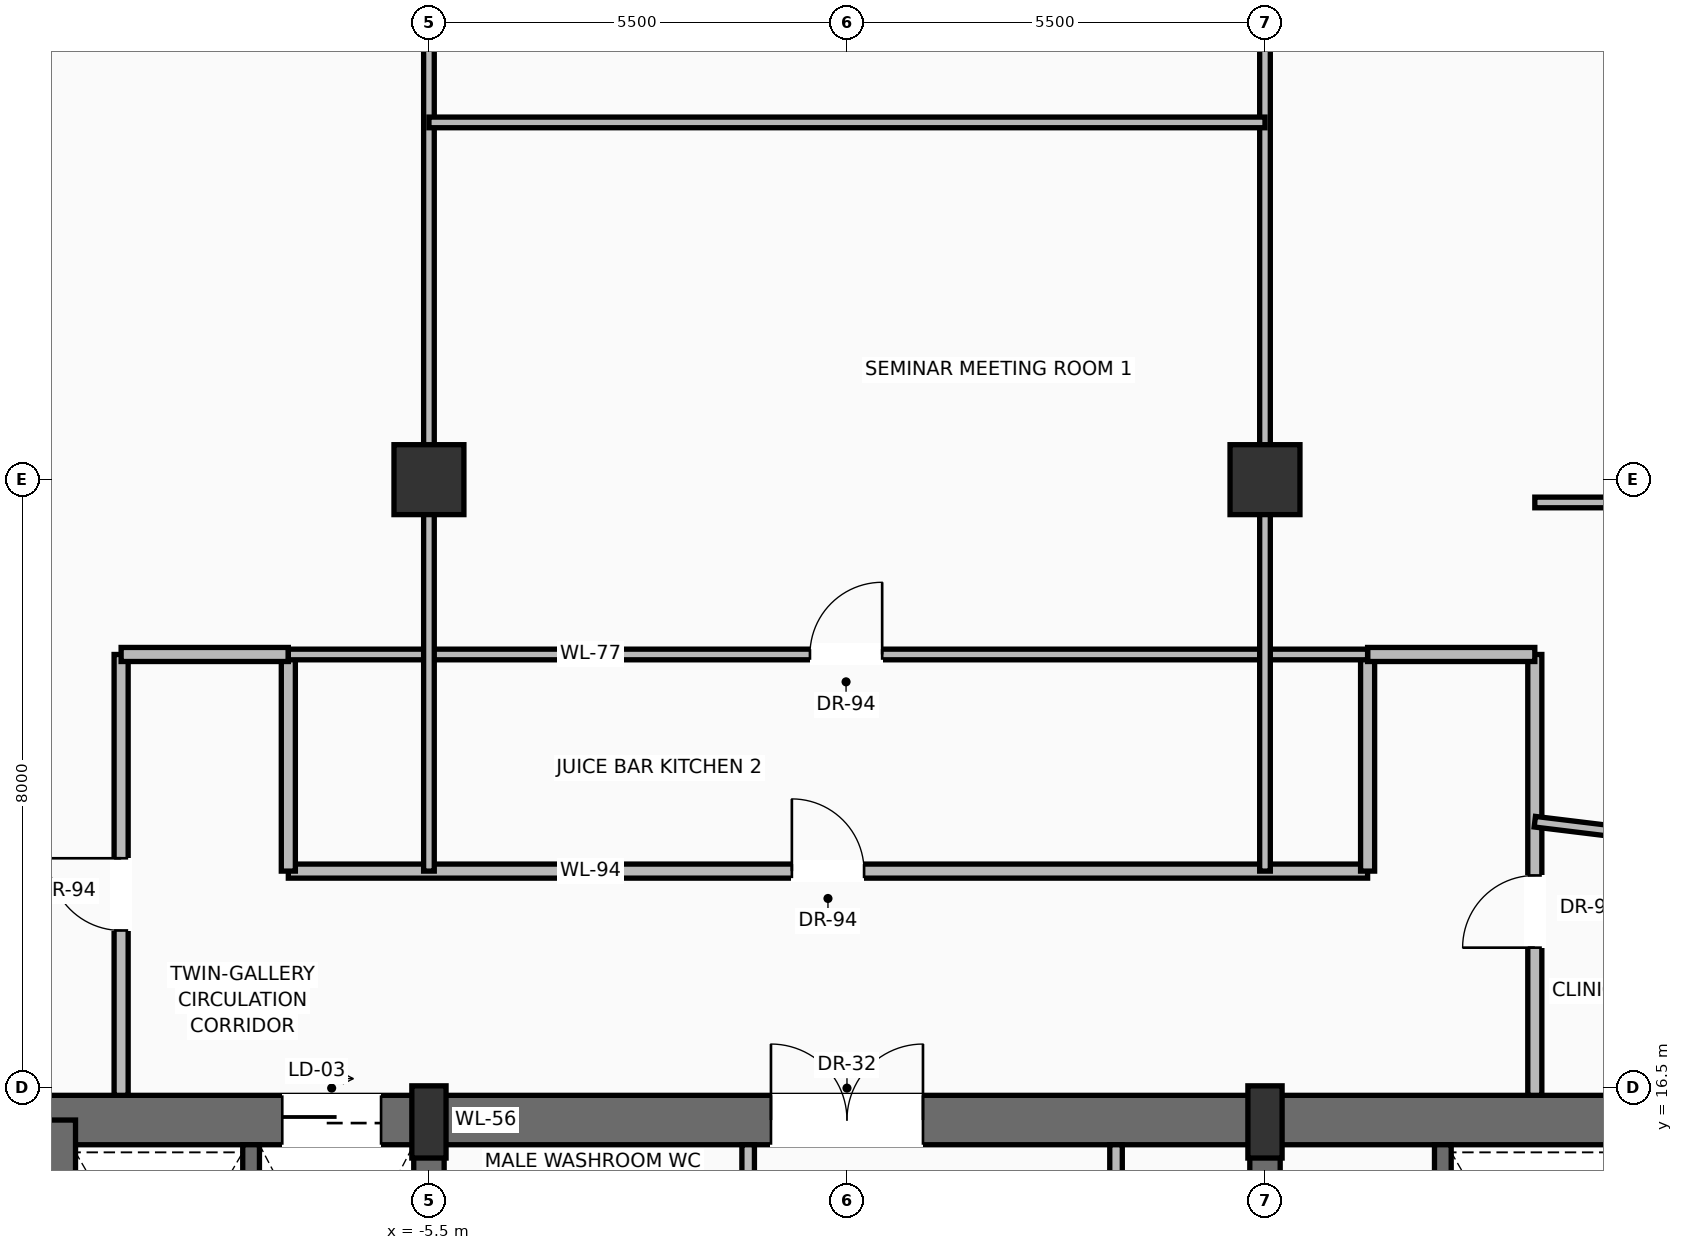
"""IFC4 building model, lengths in metres.
Left out: names, types, materials, properties, quantities, classifications, styles, units other than length and angle.
Written with IfcOpenShell. Run it as: python <this file> out.ifc"""

import sys

from ifc_helpers import new_model, si_unit, direction, frame, frame_2d, origin, origin_2d, place, context, subcontext, project, spatial, rectangle, extrude, source, transform, mapped, element, fill, save


model = new_model("IFC4")
c1 = context("Model", 3, precision=1e-05, world=origin(), true_north=direction((0.0, 1.0)))
c2 = subcontext(c1, "Body", "Model", "MODEL_VIEW")
j1 = project(units=[si_unit("LENGTHUNIT", "METRE"), si_unit("PLANEANGLEUNIT", "RADIAN")], contexts=[c1])
p1 = place(None, origin())
s1 = spatial("IfcSite", under=j1, at=p1, CompositionType="ELEMENT")
p2 = place(p1, origin())
s2 = spatial("IfcBuilding", under=s1, at=p2, CompositionType="ELEMENT")
p3 = place(p2, frame((0.0, 0.0, 200.6)))
s3 = spatial("IfcBuildingStorey", under=s2, at=p3, CompositionType="ELEMENT", Elevation=200.6)
p4 = place(p3, frame((-10.8, 16.075, 0.0), z_axis=(0.0, 0.0, 1.0), x_axis=(1.0, 0.0, 0.0)))
e1 = element("IfcWall", 1, at=p4, inside=s3, PredefinedType="SHEAR", context=c2, shape_type="SweptSolid", body=[
    extrude(rectangle(XDim=21.6, YDim=0.65, at=frame_2d((10.8, 0.0))), origin(), (0.0, 0.0, 1.0), 3.47),
])
p5 = place(p4, frame((3.37, 0.0, 0.0)))
e2 = element("IfcOpeningElement", 2, at=p5, cuts=e1, PredefinedType="OPENING", context=c2, shape_type="SweptSolid", body=[
    extrude(rectangle(XDim=1.3, YDim=2.3, at=frame_2d((0.65, 1.15))), frame((0.0, 0.335, 0.0), z_axis=(0.0, -1.0, 0.0), x_axis=(1.0, 0.0, 0.0)), (0.0, 0.0, 1.0), 0.67),
])
p6 = place(p4, frame((9.8, 0.0, 0.0)))
e3 = element("IfcOpeningElement", 3, at=p6, cuts=e1, PredefinedType="OPENING", context=c2, shape_type="SweptSolid", body=[
    extrude(rectangle(XDim=2.0, YDim=2.4, at=frame_2d((1.0, 1.2))), frame((0.0, 0.335, 0.0), z_axis=(0.0, -1.0, 0.0), x_axis=(1.0, 0.0, 0.0)), (0.0, 0.0, 1.0), 0.67),
])
p7 = place(p3, frame((-10.475, 0.525, 0.0), z_axis=(0.0, 0.0, 1.0), x_axis=(0.0, 1.0, 0.0)))
e4 = element("IfcWall", 4, at=p7, inside=s3, PredefinedType="SHEAR", context=c2, shape_type="SweptSolid", body=[
    extrude(rectangle(XDim=15.55, YDim=0.65, at=frame_2d((7.775, 0.0))), origin(), (0.0, 0.0, 1.0), 3.47),
])
p8 = place(p3, frame((-5.5, 0.525, 0.0), z_axis=(0.0, 0.0, 1.0), x_axis=(0.0, 1.0, 0.0)))
e5 = element("IfcWall", 5, at=p8, inside=s3, PredefinedType="SHEAR", context=c2, shape_type="SweptSolid", body=[
    extrude(rectangle(XDim=15.55, YDim=0.4, at=frame_2d((7.775, 0.0))), origin(), (0.0, 0.0, 1.0), 3.47),
])
p9 = place(p8, frame((8.975, 0.0, 0.0)))
e6 = element("IfcOpeningElement", 6, at=p9, cuts=e5, PredefinedType="OPENING", context=c2, shape_type="SweptSolid", body=[
    extrude(rectangle(XDim=1.1, YDim=2.2, at=frame_2d((0.55, 1.1))), frame((0.0, 0.21, 0.0), z_axis=(0.0, -1.0, 0.0), x_axis=(1.0, 0.0, 0.0)), (0.0, 0.0, 1.0), 0.42),
])
p10 = place(p3, frame((5.5, 0.525, 0.0), z_axis=(0.0, 0.0, 1.0), x_axis=(0.0, 1.0, 0.0)))
e7 = element("IfcWall", 7, at=p10, inside=s3, PredefinedType="SHEAR", context=c2, shape_type="SweptSolid", body=[
    extrude(rectangle(XDim=15.55, YDim=0.4, at=frame_2d((7.775, 0.0))), origin(), (0.0, 0.0, 1.0), 3.47),
])
p11 = place(p10, frame((8.975, 0.0, 0.0)))
e8 = element("IfcOpeningElement", 8, at=p11, cuts=e7, PredefinedType="OPENING", context=c2, shape_type="SweptSolid", body=[
    extrude(rectangle(XDim=1.1, YDim=2.2, at=frame_2d((0.55, 1.1))), frame((0.0, 0.21, 0.0), z_axis=(0.0, -1.0, 0.0), x_axis=(1.0, 0.0, 0.0)), (0.0, 0.0, 1.0), 0.42),
])
m1 = source(origin(), c2, "Body", "SweptSolid", [
    extrude(rectangle(XDim=0.45, YDim=0.95, at=origin_2d()), origin(), (0.0, 0.0, 1.0), 3.7),
])
for number, where, z_axis, x_axis in (
    (9, (-5.5, 16.05, 0.0), (0.0, 0.0, 1.0), (1.0, 0.0, 0.0)),
    (10, (5.5, 16.05, 0.0), (0.0, 0.0, 1.0), (1.0, 0.0, 0.0)),
):
    element("IfcColumn", number, at=place(p3, frame(where, z_axis=z_axis, x_axis=x_axis)), inside=s3, PredefinedType="PILASTER", context=c2, shape_type="MappedRepresentation", body=[
        mapped(m1, transform((0.0, 0.0, 0.0), scale=1.0)),
    ])
m2 = source(origin(), c2, "Body", "SweptSolid", [
    extrude(rectangle(XDim=0.92, YDim=0.92, at=origin_2d()), origin(), (0.0, 0.0, 1.0), 3.7),
])
for number, where, z_axis, x_axis in (
    (11, (-5.5, 24.5, 0.0), (0.0, 0.0, 1.0), (1.0, 0.0, 0.0)),
    (12, (5.5, 24.5, 0.0), (0.0, 0.0, 1.0), (1.0, 0.0, 0.0)),
):
    element("IfcColumn", number, at=place(p3, frame(where, z_axis=z_axis, x_axis=x_axis)), inside=s3, PredefinedType="COLUMN", context=c2, shape_type="MappedRepresentation", body=[
        mapped(m2, transform((0.0, 0.0, 0.0), scale=1.0)),
    ])
p12 = place(p3, frame((-20.163, 15.984, 0.0), z_axis=(0.0, 0.0, 1.0), x_axis=(0.521623449413, 0.853175818353, 0.0)))
e13 = element("IfcWall", 13, at=p12, inside=s3, PredefinedType="SOLIDWALL", context=c2, shape_type="SweptSolid", body=[
    extrude(rectangle(XDim=19.073, YDim=0.28, at=frame_2d((9.537, 0.0))), origin(), (0.0, 0.0, 1.0), 3.05),
])
p13 = place(p12, frame((4.578, 0.0, 0.0)))
e14 = element("IfcOpeningElement", 14, at=p13, cuts=e13, PredefinedType="OPENING", context=c2, shape_type="SweptSolid", body=[
    extrude(rectangle(XDim=1.6, YDim=2.35, at=frame_2d((0.8, 1.175))), frame((0.0, 0.15, 0.0), z_axis=(0.0, -1.0, 0.0), x_axis=(1.0, 0.0, 0.0)), (0.0, 0.0, 1.0), 0.3),
])
p14 = place(p12, frame((12.97, 0.0, 0.9)))
e15 = element("IfcOpeningElement", 15, at=p14, cuts=e13, PredefinedType="OPENING", context=c2, shape_type="SweptSolid", body=[
    extrude(rectangle(XDim=1.55, YDim=1.85, at=frame_2d((0.775, 0.925))), frame((0.0, 0.15, 0.0), z_axis=(0.0, -1.0, 0.0), x_axis=(1.0, 0.0, 0.0)), (0.0, 0.0, 1.0), 0.3),
])
p15 = place(p3, frame((9.517, 32.336, 0.0), z_axis=(0.0, 0.0, 1.0), x_axis=(0.533881383678, -0.845559381807, 0.0)))
e16 = element("IfcWall", 16, at=p15, inside=s3, PredefinedType="SOLIDWALL", context=c2, shape_type="SweptSolid", body=[
    extrude(rectangle(XDim=19.095, YDim=0.28, at=frame_2d((9.547, 0.0))), origin(), (0.0, 0.0, 1.0), 3.05),
])
p16 = place(p15, frame((4.583, 0.0, 0.0)))
e17 = element("IfcOpeningElement", 17, at=p16, cuts=e16, PredefinedType="OPENING", context=c2, shape_type="SweptSolid", body=[
    extrude(rectangle(XDim=1.6, YDim=2.35, at=frame_2d((0.8, 1.175))), frame((0.0, 0.15, 0.0), z_axis=(0.0, -1.0, 0.0), x_axis=(1.0, 0.0, 0.0)), (0.0, 0.0, 1.0), 0.3),
])
p17 = place(p15, frame((12.985, 0.0, 0.9)))
e18 = element("IfcOpeningElement", 18, at=p17, cuts=e16, PredefinedType="OPENING", context=c2, shape_type="SweptSolid", body=[
    extrude(rectangle(XDim=1.55, YDim=1.85, at=frame_2d((0.775, 0.925))), frame((0.0, 0.15, 0.0), z_axis=(0.0, -1.0, 0.0), x_axis=(1.0, 0.0, 0.0)), (0.0, 0.0, 1.0), 0.3),
])
for number, where, z_axis, x_axis in (
    (19, (-7.84, 11.87, 0.0), (0.0, 0.0, 1.0), (0.0, 1.0, 0.0)),
    (20, (7.84, 11.87, 0.0), (0.0, 0.0, 1.0), (0.0, 1.0, 0.0)),
):
    element("IfcWall", number, at=place(p3, frame(where, z_axis=z_axis, x_axis=x_axis)), inside=s3, PredefinedType="SOLIDWALL", context=c2, shape_type="SweptSolid", body=[
        extrude(rectangle(XDim=3.88, YDim=0.22, at=frame_2d((1.94, 0.0))), origin(), (0.0, 0.0, 1.0), 3.47),
    ])
p18 = place(p3, frame((-1.3, 13.6, 0.0), z_axis=(0.0, 0.0, 1.0), x_axis=(0.0, 1.0, 0.0)))
e21 = element("IfcWall", 21, at=p18, inside=s3, PredefinedType="PARTITIONING", context=c2, shape_type="SweptSolid", body=[
    extrude(rectangle(XDim=2.15, YDim=0.165, at=frame_2d((1.075, 0.0))), origin(), (0.0, 0.0, 1.0), 3.462),
])
p19 = place(p18, frame((0.55, 0.0, 0.0)))
e22 = element("IfcOpeningElement", 22, at=p19, cuts=e21, PredefinedType="OPENING", context=c2, shape_type="SweptSolid", body=[
    extrude(rectangle(XDim=0.9, YDim=2.1, at=frame_2d((0.45, 1.05))), frame((0.0, 0.093, 0.0), z_axis=(0.0, -1.0, 0.0), x_axis=(1.0, 0.0, 0.0)), (0.0, 0.0, 1.0), 0.185),
])
p20 = place(p3, frame((3.54, 11.22, 0.0), z_axis=(0.0, 0.0, 1.0), x_axis=(0.0, 1.0, 0.0)))
e23 = element("IfcWall", 23, at=p20, inside=s3, PredefinedType="PARTITIONING", context=c2, shape_type="SweptSolid", body=[
    extrude(rectangle(XDim=4.53, YDim=0.165, at=frame_2d((2.265, 0.0))), origin(), (0.0, 0.0, 1.0), 3.462),
])
p21 = place(p20, frame((1.25, 0.0, 0.0)))
e24 = element("IfcOpeningElement", 24, at=p21, cuts=e23, PredefinedType="OPENING", context=c2, shape_type="SweptSolid", body=[
    extrude(rectangle(XDim=0.9, YDim=2.1, at=frame_2d((0.45, 1.05))), frame((0.0, 0.093, 0.0), z_axis=(0.0, -1.0, 0.0), x_axis=(1.0, 0.0, 0.0)), (0.0, 0.0, 1.0), 0.185),
])
p22 = place(p3, frame((-7.35, 19.35, 0.0), z_axis=(0.0, 0.0, 1.0), x_axis=(1.0, 0.0, 0.0)))
e25 = element("IfcWall", 25, at=p22, inside=s3, PredefinedType="PARTITIONING", context=c2, shape_type="SweptSolid", body=[
    extrude(rectangle(XDim=14.2, YDim=0.185, at=frame_2d((7.1, 0.0))), origin(), (0.0, 0.0, 1.0), 2.846),
])
p23 = place(p22, frame((6.625, 0.0, 0.0)))
e26 = element("IfcOpeningElement", 26, at=p23, cuts=e25, PredefinedType="OPENING", context=c2, shape_type="SweptSolid", body=[
    extrude(rectangle(XDim=0.95, YDim=2.2, at=frame_2d((0.475, 1.1))), frame((0.0, 0.103, 0.0), z_axis=(0.0, -1.0, 0.0), x_axis=(1.0, 0.0, 0.0)), (0.0, 0.0, 1.0), 0.205),
])
for number, where, z_axis, x_axis in (
    (27, (-7.35, 19.35, 0.0), (0.0, 0.0, 1.0), (0.0, 1.0, 0.0)),
    (28, (6.85, 19.35, 0.0), (0.0, 0.0, 1.0), (0.0, 1.0, 0.0)),
):
    element("IfcWall", number, at=place(p3, frame(where, z_axis=z_axis, x_axis=x_axis)), inside=s3, PredefinedType="PARTITIONING", context=c2, shape_type="SweptSolid", body=[
        extrude(rectangle(XDim=2.85, YDim=0.185, at=frame_2d((1.425, 0.0))), origin(), (0.0, 0.0, 1.0), 3.462),
    ])
p24 = place(p3, frame((-9.55, 16.4, 0.0), z_axis=(0.0, 0.0, 1.0), x_axis=(0.0, 1.0, 0.0)))
e29 = element("IfcWall", 29, at=p24, inside=s3, PredefinedType="PARTITIONING", context=c2, shape_type="SweptSolid", body=[
    extrude(rectangle(XDim=5.8, YDim=0.185, at=frame_2d((2.9, 0.0))), origin(), (0.0, 0.0, 1.0), 3.462),
])
p25 = place(p24, frame((2.169, 0.0, 0.0)))
e30 = element("IfcOpeningElement", 30, at=p25, cuts=e29, PredefinedType="OPENING", context=c2, shape_type="SweptSolid", body=[
    extrude(rectangle(XDim=0.95, YDim=2.2, at=frame_2d((0.475, 1.1))), frame((0.0, 0.103, 0.0), z_axis=(0.0, -1.0, 0.0), x_axis=(1.0, 0.0, 0.0)), (0.0, 0.0, 1.0), 0.205),
])
p26 = place(p3, frame((9.05, 16.4, 0.0), z_axis=(0.0, 0.0, 1.0), x_axis=(0.0, 1.0, 0.0)))
e31 = element("IfcWall", 31, at=p26, inside=s3, PredefinedType="PARTITIONING", context=c2, shape_type="SweptSolid", body=[
    extrude(rectangle(XDim=5.8, YDim=0.185, at=frame_2d((2.9, 0.0))), origin(), (0.0, 0.0, 1.0), 3.462),
])
p27 = place(p26, frame((1.943, 0.0, 0.0)))
e32 = element("IfcOpeningElement", 32, at=p27, cuts=e31, PredefinedType="OPENING", context=c2, shape_type="SweptSolid", body=[
    extrude(rectangle(XDim=0.95, YDim=2.2, at=frame_2d((0.475, 1.1))), frame((0.0, 0.103, 0.0), z_axis=(0.0, -1.0, 0.0), x_axis=(1.0, 0.0, 0.0)), (0.0, 0.0, 1.0), 0.205),
])
for number, where, z_axis, x_axis in (
    (33, (-9.55, 22.2, 0.0), (0.0, 0.0, 1.0), (1.0, 0.0, 0.0)),
    (34, (6.85, 22.2, 0.0), (0.0, 0.0, 1.0), (1.0, 0.0, 0.0)),
):
    element("IfcWall", number, at=place(p3, frame(where, z_axis=z_axis, x_axis=x_axis)), inside=s3, PredefinedType="PARTITIONING", context=c2, shape_type="SweptSolid", body=[
        extrude(rectangle(XDim=2.2, YDim=0.185, at=frame_2d((1.1, 0.0))), origin(), (0.0, 0.0, 1.0), 3.049),
    ])
p28 = place(p3, frame((-7.35, 22.2, 0.0), z_axis=(0.0, 0.0, 1.0), x_axis=(1.0, 0.0, 0.0)))
e35 = element("IfcWall", 35, at=p28, inside=s3, PredefinedType="PARTITIONING", context=c2, shape_type="SweptSolid", body=[
    extrude(rectangle(XDim=14.2, YDim=0.14, at=frame_2d((7.1, 0.0))), origin(), (0.0, 0.0, 1.0), 3.049),
])
p29 = place(p28, frame((6.863, 0.0, 0.0)))
e36 = element("IfcOpeningElement", 36, at=p29, cuts=e35, PredefinedType="OPENING", context=c2, shape_type="SweptSolid", body=[
    extrude(rectangle(XDim=0.95, YDim=2.2, at=frame_2d((0.475, 1.1))), frame((0.0, 0.08, 0.0), z_axis=(0.0, -1.0, 0.0), x_axis=(1.0, 0.0, 0.0)), (0.0, 0.0, 1.0), 0.16),
])
for number, where, z_axis, x_axis in (
    (37, (-5.5, 19.35, 0.0), (0.0, 0.0, 1.0), (0.0, 1.0, 0.0)),
    (38, (5.5, 19.35, 0.0), (0.0, 0.0, 1.0), (0.0, 1.0, 0.0)),
):
    element("IfcWall", number, at=place(p3, frame(where, z_axis=z_axis, x_axis=x_axis)), inside=s3, PredefinedType="PARTITIONING", context=c2, shape_type="SweptSolid", body=[
        extrude(rectangle(XDim=13.15, YDim=0.14, at=frame_2d((6.575, 0.0))), origin(), (0.0, 0.0, 1.0), 2.846),
    ])
p30 = place(p3, frame((-5.5, 29.2, 0.0), z_axis=(0.0, 0.0, 1.0), x_axis=(1.0, 0.0, 0.0)))
e39 = element("IfcWall", 39, at=p30, inside=s3, PredefinedType="PARTITIONING", context=c2, shape_type="SweptSolid", body=[
    extrude(rectangle(XDim=11.0, YDim=0.14, at=frame_2d((5.5, 0.0))), origin(), (0.0, 0.0, 1.0), 3.462),
])
p31 = place(p3, frame((9.05, 20.0, 0.0), z_axis=(0.0, 0.0, 1.0), x_axis=(0.992652190929, -0.121002594366, 0.0)))
e40 = element("IfcWall", 40, at=p31, inside=s3, PredefinedType="PARTITIONING", context=c2, shape_type="SweptSolid", body=[
    extrude(rectangle(XDim=9.178, YDim=0.14, at=frame_2d((4.589, 0.0))), origin(), (0.0, 0.0, 1.0), 3.049),
])
p32 = place(p3, frame((9.05, 24.2, 0.0), z_axis=(0.0, 0.0, 1.0), x_axis=(1.0, 0.0, 0.0)))
e41 = element("IfcWall", 41, at=p32, inside=s3, PredefinedType="PARTITIONING", context=c2, shape_type="SweptSolid", body=[
    extrude(rectangle(XDim=5.758, YDim=0.14, at=frame_2d((2.879, 0.0))), origin(), (0.0, 0.0, 1.0), 3.462),
])
m3 = source(origin(), c2, "Body", "SweptSolid", [
    extrude(rectangle(XDim=1.3, YDim=2.3, at=frame_2d((0.65, 1.15))), frame((0.0, 0.025, 0.0), z_axis=(0.0, -1.0, 0.0), x_axis=(1.0, 0.0, 0.0)), (0.0, 0.0, 1.0), 0.05),
])
p33 = place(p5, origin())
e42 = element("IfcDoor", 42, at=p33, inside=s3, OperationType="SLIDING_TO_RIGHT", PredefinedType="DOOR", context=c2, shape_type="MappedRepresentation", body=[
    mapped(m3, transform((0.0, 0.0, 0.0), scale=1.0)),
])
fill(e2, e42)
m4 = source(origin(), c2, "Body", "SweptSolid", [
    extrude(rectangle(XDim=2.0, YDim=2.4, at=frame_2d((1.0, 1.2))), frame((0.0, 0.025, 0.0), z_axis=(0.0, -1.0, 0.0), x_axis=(1.0, 0.0, 0.0)), (0.0, 0.0, 1.0), 0.05),
])
p34 = place(p6, origin())
e43 = element("IfcDoor", 43, at=p34, inside=s3, OperationType="DOUBLE_DOOR_SINGLE_SWING", PredefinedType="DOOR", context=c2, shape_type="MappedRepresentation", body=[
    mapped(m4, transform((0.0, 0.0, 0.0), scale=1.0)),
])
fill(e3, e43)
m5 = source(origin(), c2, "Body", "SweptSolid", [
    extrude(rectangle(XDim=0.95, YDim=2.2, at=frame_2d((0.475, 1.1))), frame((0.0, 0.025, 0.0), z_axis=(0.0, -1.0, 0.0), x_axis=(1.0, 0.0, 0.0)), (0.0, 0.0, 1.0), 0.05),
])
p35 = place(p23, origin())
e44 = element("IfcDoor", 44, at=p35, inside=s3, OperationType="SINGLE_SWING_LEFT", PredefinedType="DOOR", context=c2, shape_type="MappedRepresentation", body=[
    mapped(m5, transform((0.0, 0.0, 0.0), scale=1.0)),
])
fill(e26, e44)
p36 = place(p25, origin())
e45 = element("IfcDoor", 45, at=p36, inside=s3, OperationType="SINGLE_SWING_RIGHT", PredefinedType="DOOR", context=c2, shape_type="MappedRepresentation", body=[
    mapped(m5, transform((0.0, 0.0, 0.0), scale=1.0)),
])
fill(e30, e45)
p37 = place(p27, origin())
e46 = element("IfcDoor", 46, at=p37, inside=s3, OperationType="SINGLE_SWING_LEFT", PredefinedType="DOOR", context=c2, shape_type="MappedRepresentation", body=[
    mapped(m5, transform((0.0, 0.0, 0.0), scale=1.0)),
])
fill(e32, e46)
p38 = place(p29, origin())
e47 = element("IfcDoor", 47, at=p38, inside=s3, OperationType="SINGLE_SWING_RIGHT", PredefinedType="DOOR", context=c2, shape_type="MappedRepresentation", body=[
    mapped(m5, transform((0.0, 0.0, 0.0), scale=1.0)),
])
fill(e36, e47)
save(model, sys.argv[1])
